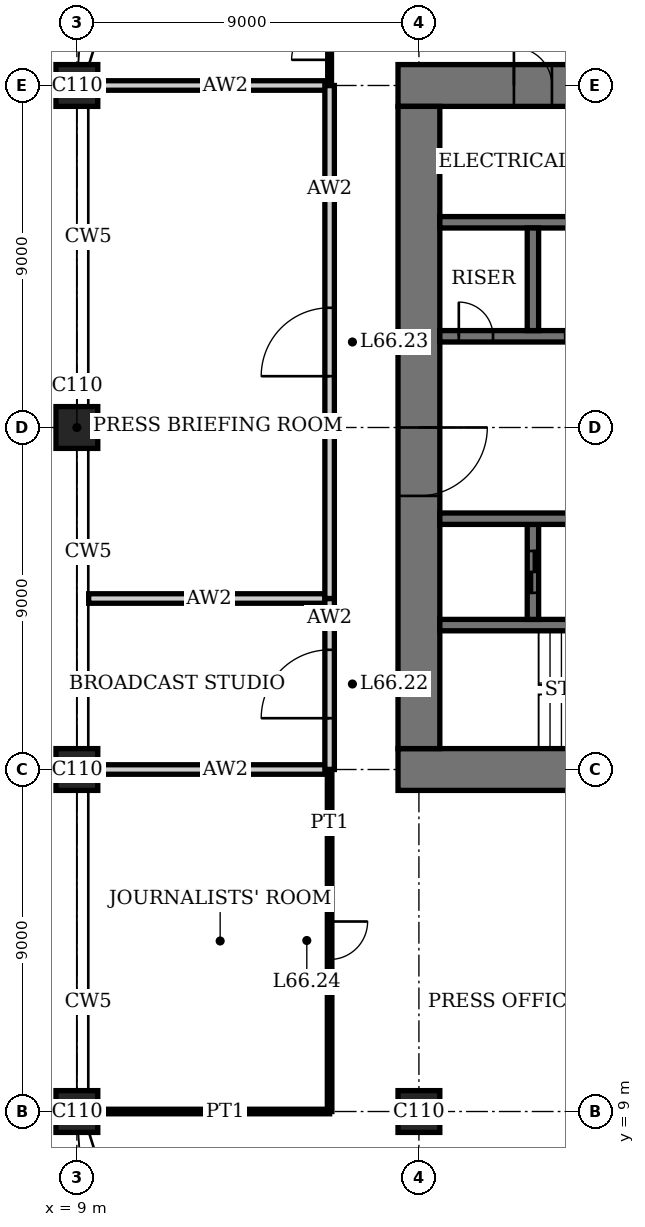
"""IFC4 building model, lengths in metres.
Left out: names, types, materials, properties, quantities, classifications, styles, units other than length and angle.
Written with IfcOpenShell. Run it as: python <this file> out.ifc"""

import sys

from ifc_helpers import new_model, si_unit, direction, frame, frame_2d, origin, origin_2d, place, context, subcontext, project, spatial, rectangle, extrude, element, fill, save


model = new_model("IFC4")
c1 = context("Model", 3, precision=1e-05, world=origin(), true_north=direction((0.0, 1.0)))
c2 = subcontext(c1, "Body", "Model", "MODEL_VIEW")
j1 = project(units=[si_unit("LENGTHUNIT", "METRE"), si_unit("PLANEANGLEUNIT", "RADIAN")], contexts=[c1])
p1 = place(None, origin())
s1 = spatial("IfcSite", under=j1, at=p1, CompositionType="ELEMENT")
p2 = place(p1, origin())
s2 = spatial("IfcBuilding", under=s1, at=p2, CompositionType="ELEMENT")
p3 = place(p2, frame((0.0, 0.0, 271.4)))
s3 = spatial("IfcBuildingStorey", under=s2, at=p3, CompositionType="ELEMENT", Elevation=271.4)
for number, where, z_axis, x_axis in (
    (1, (9.0, 9.0, 0.0), (0.0, 0.0, 1.0), (1.0, 0.0, 0.0)),
    (2, (9.0, 18.0, 0.0), (0.0, 0.0, 1.0), (1.0, 0.0, 0.0)),
    (3, (9.0, 27.0, 0.0), (0.0, 0.0, 1.0), (1.0, 0.0, 0.0)),
    (4, (9.0, 36.0, 0.0), (0.0, 0.0, 1.0), (1.0, 0.0, 0.0)),
    (5, (18.0, 9.0, 0.0), (0.0, 0.0, 1.0), (1.0, 0.0, 0.0)),
):
    element("IfcColumn", number, at=place(p3, frame(where, z_axis=z_axis, x_axis=x_axis)), inside=s3, PredefinedType="COLUMN", context=c2, shape_type="SweptSolid", body=[
        extrude(rectangle(XDim=1.1, YDim=1.1, at=origin_2d()), origin(), (0.0, 0.0, 1.0), 4.0),
    ])
p4 = place(p3, frame((17.45, 18.0, 0.0), z_axis=(0.0, 0.0, 1.0), x_axis=(1.0, 0.0, 0.0)))
e6 = element("IfcWall", 6, at=p4, inside=s3, PredefinedType="SHEAR", context=c2, shape_type="SweptSolid", body=[
    extrude(rectangle(XDim=28.1, YDim=1.1, at=frame_2d((14.05, 0.0))), origin(), (0.0, 0.0, 1.0), 4.0),
])
p5 = place(p4, frame((11.55, 0.0, 0.0)))
e7 = element("IfcOpeningElement", 7, at=p5, cuts=e6, PredefinedType="OPENING", context=c2, shape_type="SweptSolid", body=[
    extrude(rectangle(XDim=1.0, YDim=2.4, at=frame_2d((0.5, 1.2))), frame((0.0, 0.56, 0.0), z_axis=(0.0, -1.0, 0.0), x_axis=(1.0, 0.0, 0.0)), (0.0, 0.0, 1.0), 1.12),
])
p6 = place(p4, frame((16.55, 0.0, 0.0)))
e8 = element("IfcOpeningElement", 8, at=p6, cuts=e6, PredefinedType="OPENING", context=c2, shape_type="SweptSolid", body=[
    extrude(rectangle(XDim=1.0, YDim=2.4, at=frame_2d((0.5, 1.2))), frame((0.0, 0.56, 0.0), z_axis=(0.0, -1.0, 0.0), x_axis=(1.0, 0.0, 0.0)), (0.0, 0.0, 1.0), 1.12),
])
p7 = place(p4, frame((20.0, 0.0, 0.0)))
e9 = element("IfcOpeningElement", 9, at=p7, cuts=e6, PredefinedType="OPENING", context=c2, shape_type="SweptSolid", body=[
    extrude(rectangle(XDim=1.1, YDim=2.4, at=frame_2d((0.55, 1.2))), frame((0.0, 0.56, 0.0), z_axis=(0.0, -1.0, 0.0), x_axis=(1.0, 0.0, 0.0)), (0.0, 0.0, 1.0), 1.12),
])
p8 = place(p4, frame((24.05, 0.0, 0.0)))
e10 = element("IfcOpeningElement", 10, at=p8, cuts=e6, PredefinedType="OPENING", context=c2, shape_type="SweptSolid", body=[
    extrude(rectangle(XDim=1.0, YDim=2.4, at=frame_2d((0.5, 1.2))), frame((0.0, 0.56, 0.0), z_axis=(0.0, -1.0, 0.0), x_axis=(1.0, 0.0, 0.0)), (0.0, 0.0, 1.0), 1.12),
])
p9 = place(p3, frame((45.55, 36.0, 0.0), z_axis=(0.0, 0.0, 1.0), x_axis=(-1.0, 0.0, 0.0)))
e11 = element("IfcWall", 11, at=p9, inside=s3, PredefinedType="SHEAR", context=c2, shape_type="SweptSolid", body=[
    extrude(rectangle(XDim=28.1, YDim=1.1, at=frame_2d((14.05, 0.0))), origin(), (0.0, 0.0, 1.0), 4.0),
])
p10 = place(p9, frame((11.55, 0.0, 0.0)))
e12 = element("IfcOpeningElement", 12, at=p10, cuts=e11, PredefinedType="OPENING", context=c2, shape_type="SweptSolid", body=[
    extrude(rectangle(XDim=1.0, YDim=2.4, at=frame_2d((0.5, 1.2))), frame((0.0, 0.56, 0.0), z_axis=(0.0, -1.0, 0.0), x_axis=(1.0, 0.0, 0.0)), (0.0, 0.0, 1.0), 1.12),
])
p11 = place(p9, frame((16.55, 0.0, 0.0)))
e13 = element("IfcOpeningElement", 13, at=p11, cuts=e11, PredefinedType="OPENING", context=c2, shape_type="SweptSolid", body=[
    extrude(rectangle(XDim=1.0, YDim=2.4, at=frame_2d((0.5, 1.2))), frame((0.0, 0.56, 0.0), z_axis=(0.0, -1.0, 0.0), x_axis=(1.0, 0.0, 0.0)), (0.0, 0.0, 1.0), 1.12),
])
p12 = place(p9, frame((20.0, 0.0, 0.0)))
e14 = element("IfcOpeningElement", 14, at=p12, cuts=e11, PredefinedType="OPENING", context=c2, shape_type="SweptSolid", body=[
    extrude(rectangle(XDim=1.1, YDim=2.4, at=frame_2d((0.55, 1.2))), frame((0.0, 0.56, 0.0), z_axis=(0.0, -1.0, 0.0), x_axis=(1.0, 0.0, 0.0)), (0.0, 0.0, 1.0), 1.12),
])
p13 = place(p9, frame((24.05, 0.0, 0.0)))
e15 = element("IfcOpeningElement", 15, at=p13, cuts=e11, PredefinedType="OPENING", context=c2, shape_type="SweptSolid", body=[
    extrude(rectangle(XDim=1.0, YDim=2.4, at=frame_2d((0.5, 1.2))), frame((0.0, 0.56, 0.0), z_axis=(0.0, -1.0, 0.0), x_axis=(1.0, 0.0, 0.0)), (0.0, 0.0, 1.0), 1.12),
])
p14 = place(p3, frame((18.0, 35.45, 0.0), z_axis=(0.0, 0.0, 1.0), x_axis=(0.0, -1.0, 0.0)))
e16 = element("IfcWall", 16, at=p14, inside=s3, PredefinedType="SHEAR", context=c2, shape_type="SweptSolid", body=[
    extrude(rectangle(XDim=16.9, YDim=1.1, at=frame_2d((8.45, 0.0))), origin(), (0.0, 0.0, 1.0), 4.0),
])
p15 = place(p14, frame((8.45, 0.0, 0.0)))
e17 = element("IfcOpeningElement", 17, at=p15, cuts=e16, PredefinedType="OPENING", context=c2, shape_type="SweptSolid", body=[
    extrude(rectangle(XDim=1.8, YDim=2.4, at=frame_2d((0.9, 1.2))), frame((0.0, 0.56, 0.0), z_axis=(0.0, -1.0, 0.0), x_axis=(1.0, 0.0, 0.0)), (0.0, 0.0, 1.0), 1.12),
])
p16 = place(p3, frame((18.55, 21.8, 0.0), z_axis=(0.0, 0.0, 1.0), x_axis=(1.0, 0.0, 0.0)))
e18 = element("IfcWall", 18, at=p16, inside=s3, PredefinedType="SHEAR", context=c2, shape_type="SweptSolid", body=[
    extrude(rectangle(XDim=8.3, YDim=0.3, at=frame_2d((4.15, 0.0))), origin(), (0.0, 0.0, 1.0), 4.0),
])
p17 = place(p16, frame((6.85, 0.0, 0.0)))
e19 = element("IfcOpeningElement", 19, at=p17, cuts=e18, PredefinedType="OPENING", context=c2, shape_type="SweptSolid", body=[
    extrude(rectangle(XDim=1.0, YDim=2.4, at=frame_2d((0.5, 1.2))), frame((0.0, 0.16, 0.0), z_axis=(0.0, -1.0, 0.0), x_axis=(1.0, 0.0, 0.0)), (0.0, 0.0, 1.0), 0.32),
])
p18 = place(p3, frame((21.0, 21.95, 0.0), z_axis=(0.0, 0.0, 1.0), x_axis=(0.0, 1.0, 0.0)))
e20 = element("IfcWall", 20, at=p18, inside=s3, PredefinedType="SHEAR", context=c2, shape_type="SweptSolid", body=[
    extrude(rectangle(XDim=2.5, YDim=0.3, at=frame_2d((1.25, 0.0))), origin(), (0.0, 0.0, 1.0), 4.0),
])
p19 = place(p18, frame((0.7, 0.0, 0.0)))
e21 = element("IfcOpeningElement", 21, at=p19, cuts=e20, PredefinedType="OPENING", context=c2, shape_type="SweptSolid", body=[
    extrude(rectangle(XDim=1.1, YDim=2.4, at=frame_2d((0.55, 1.2))), frame((0.0, 0.16, 0.0), z_axis=(0.0, -1.0, 0.0), x_axis=(1.0, 0.0, 0.0)), (0.0, 0.0, 1.0), 0.32),
])
p20 = place(p3, frame((18.55, 24.6, 0.0), z_axis=(0.0, 0.0, 1.0), x_axis=(1.0, 0.0, 0.0)))
e22 = element("IfcWall", 22, at=p20, inside=s3, PredefinedType="SHEAR", context=c2, shape_type="SweptSolid", body=[
    extrude(rectangle(XDim=25.9, YDim=0.3, at=frame_2d((12.95, 0.0))), origin(), (0.0, 0.0, 1.0), 4.0),
])
p21 = place(p20, frame((4.95, 0.0, 0.0)))
e23 = element("IfcOpeningElement", 23, at=p21, cuts=e22, PredefinedType="OPENING", context=c2, shape_type="SweptSolid", body=[
    extrude(rectangle(XDim=1.0, YDim=2.4, at=frame_2d((0.5, 1.2))), frame((0.0, 0.16, 0.0), z_axis=(0.0, -1.0, 0.0), x_axis=(1.0, 0.0, 0.0)), (0.0, 0.0, 1.0), 0.32),
])
p22 = place(p20, frame((24.5, 0.0, 0.0)))
e24 = element("IfcOpeningElement", 24, at=p22, cuts=e22, PredefinedType="OPENING", context=c2, shape_type="SweptSolid", body=[
    extrude(rectangle(XDim=0.9, YDim=2.1, at=frame_2d((0.45, 1.05))), frame((0.0, 0.16, 0.0), z_axis=(0.0, -1.0, 0.0), x_axis=(1.0, 0.0, 0.0)), (0.0, 0.0, 1.0), 0.32),
])
p23 = place(p20, frame((9.4, 0.0, 0.0)))
e25 = element("IfcOpeningElement", 25, at=p23, cuts=e22, PredefinedType="OPENING", context=c2, shape_type="SweptSolid", body=[
    extrude(rectangle(XDim=1.1, YDim=2.4, at=frame_2d((0.55, 1.2))), frame((0.0, 0.16, 0.0), z_axis=(0.0, -1.0, 0.0), x_axis=(1.0, 0.0, 0.0)), (0.0, 0.0, 1.0), 0.32),
])
p24 = place(p20, frame((12.4, 0.0, 0.0)))
e26 = element("IfcOpeningElement", 26, at=p24, cuts=e22, PredefinedType="OPENING", context=c2, shape_type="SweptSolid", body=[
    extrude(rectangle(XDim=1.1, YDim=2.4, at=frame_2d((0.55, 1.2))), frame((0.0, 0.16, 0.0), z_axis=(0.0, -1.0, 0.0), x_axis=(1.0, 0.0, 0.0)), (0.0, 0.0, 1.0), 0.32),
])
p25 = place(p20, frame((15.4, 0.0, 0.0)))
e27 = element("IfcOpeningElement", 27, at=p25, cuts=e22, PredefinedType="OPENING", context=c2, shape_type="SweptSolid", body=[
    extrude(rectangle(XDim=1.1, YDim=2.4, at=frame_2d((0.55, 1.2))), frame((0.0, 0.16, 0.0), z_axis=(0.0, -1.0, 0.0), x_axis=(1.0, 0.0, 0.0)), (0.0, 0.0, 1.0), 0.32),
])
p26 = place(p20, frame((18.4, 0.0, 0.0)))
e28 = element("IfcOpeningElement", 28, at=p26, cuts=e22, PredefinedType="OPENING", context=c2, shape_type="SweptSolid", body=[
    extrude(rectangle(XDim=1.1, YDim=2.4, at=frame_2d((0.55, 1.2))), frame((0.0, 0.16, 0.0), z_axis=(0.0, -1.0, 0.0), x_axis=(1.0, 0.0, 0.0)), (0.0, 0.0, 1.0), 0.32),
])
p27 = place(p20, frame((21.3, 0.0, 0.0)))
e29 = element("IfcOpeningElement", 29, at=p27, cuts=e22, PredefinedType="OPENING", context=c2, shape_type="SweptSolid", body=[
    extrude(rectangle(XDim=1.3, YDim=2.4, at=frame_2d((0.65, 1.2))), frame((0.0, 0.16, 0.0), z_axis=(0.0, -1.0, 0.0), x_axis=(1.0, 0.0, 0.0)), (0.0, 0.0, 1.0), 0.32),
])
p28 = place(p3, frame((18.55, 29.4, 0.0), z_axis=(0.0, 0.0, 1.0), x_axis=(1.0, 0.0, 0.0)))
e30 = element("IfcWall", 30, at=p28, inside=s3, PredefinedType="SHEAR", context=c2, shape_type="SweptSolid", body=[
    extrude(rectangle(XDim=25.9, YDim=0.3, at=frame_2d((12.95, 0.0))), origin(), (0.0, 0.0, 1.0), 4.0),
])
p29 = place(p28, frame((19.95, 0.0, 0.0)))
e31 = element("IfcOpeningElement", 31, at=p29, cuts=e30, PredefinedType="OPENING", context=c2, shape_type="SweptSolid", body=[
    extrude(rectangle(XDim=1.0, YDim=2.4, at=frame_2d((0.5, 1.2))), frame((0.0, 0.16, 0.0), z_axis=(0.0, -1.0, 0.0), x_axis=(1.0, 0.0, 0.0)), (0.0, 0.0, 1.0), 0.32),
])
p30 = place(p28, frame((0.5, 0.0, 0.0)))
e32 = element("IfcOpeningElement", 32, at=p30, cuts=e30, PredefinedType="OPENING", context=c2, shape_type="SweptSolid", body=[
    extrude(rectangle(XDim=0.9, YDim=2.1, at=frame_2d((0.45, 1.05))), frame((0.0, 0.16, 0.0), z_axis=(0.0, -1.0, 0.0), x_axis=(1.0, 0.0, 0.0)), (0.0, 0.0, 1.0), 0.32),
])
p31 = place(p28, frame((15.45, 0.0, 0.0)))
e33 = element("IfcOpeningElement", 33, at=p31, cuts=e30, PredefinedType="OPENING", context=c2, shape_type="SweptSolid", body=[
    extrude(rectangle(XDim=1.0, YDim=2.4, at=frame_2d((0.5, 1.2))), frame((0.0, 0.16, 0.0), z_axis=(0.0, -1.0, 0.0), x_axis=(1.0, 0.0, 0.0)), (0.0, 0.0, 1.0), 0.32),
])
p32 = place(p28, frame((12.45, 0.0, 0.0)))
e34 = element("IfcOpeningElement", 34, at=p32, cuts=e30, PredefinedType="OPENING", context=c2, shape_type="SweptSolid", body=[
    extrude(rectangle(XDim=1.0, YDim=2.4, at=frame_2d((0.5, 1.2))), frame((0.0, 0.16, 0.0), z_axis=(0.0, -1.0, 0.0), x_axis=(1.0, 0.0, 0.0)), (0.0, 0.0, 1.0), 0.32),
])
p33 = place(p28, frame((9.45, 0.0, 0.0)))
e35 = element("IfcOpeningElement", 35, at=p33, cuts=e30, PredefinedType="OPENING", context=c2, shape_type="SweptSolid", body=[
    extrude(rectangle(XDim=1.0, YDim=2.4, at=frame_2d((0.5, 1.2))), frame((0.0, 0.16, 0.0), z_axis=(0.0, -1.0, 0.0), x_axis=(1.0, 0.0, 0.0)), (0.0, 0.0, 1.0), 0.32),
])
p34 = place(p28, frame((6.45, 0.0, 0.0)))
e36 = element("IfcOpeningElement", 36, at=p34, cuts=e30, PredefinedType="OPENING", context=c2, shape_type="SweptSolid", body=[
    extrude(rectangle(XDim=1.0, YDim=2.4, at=frame_2d((0.5, 1.2))), frame((0.0, 0.16, 0.0), z_axis=(0.0, -1.0, 0.0), x_axis=(1.0, 0.0, 0.0)), (0.0, 0.0, 1.0), 0.32),
])
p35 = place(p28, frame((3.3, 0.0, 0.0)))
e37 = element("IfcOpeningElement", 37, at=p35, cuts=e30, PredefinedType="OPENING", context=c2, shape_type="SweptSolid", body=[
    extrude(rectangle(XDim=1.3, YDim=2.4, at=frame_2d((0.65, 1.2))), frame((0.0, 0.16, 0.0), z_axis=(0.0, -1.0, 0.0), x_axis=(1.0, 0.0, 0.0)), (0.0, 0.0, 1.0), 0.32),
])
p36 = place(p3, frame((18.55, 32.4, 0.0), z_axis=(0.0, 0.0, 1.0), x_axis=(1.0, 0.0, 0.0)))
e38 = element("IfcWall", 38, at=p36, inside=s3, PredefinedType="SHEAR", context=c2, shape_type="SweptSolid", body=[
    extrude(rectangle(XDim=17.3, YDim=0.3, at=frame_2d((8.65, 0.0))), origin(), (0.0, 0.0, 1.0), 4.0),
])
p37 = place(p3, frame((21.0, 29.55, 0.0), z_axis=(0.0, 0.0, 1.0), x_axis=(0.0, 1.0, 0.0)))
e39 = element("IfcWall", 39, at=p37, inside=s3, PredefinedType="SHEAR", context=c2, shape_type="SweptSolid", body=[
    extrude(rectangle(XDim=2.7, YDim=0.3, at=frame_2d((1.35, 0.0))), origin(), (0.0, 0.0, 1.0), 4.0),
])
p38 = place(p3, frame((9.55, 9.0, 0.0), z_axis=(0.0, 0.0, 1.0), x_axis=(1.0, 0.0, 0.0)))
e40 = element("IfcWall", 40, at=p38, inside=s3, PredefinedType="PARTITIONING", context=c2, shape_type="SweptSolid", body=[
    extrude(rectangle(XDim=6.1, YDim=0.12, at=frame_2d((3.05, 0.0))), origin(), (0.0, 0.0, 1.0), 3.05),
])
p39 = place(p3, frame((9.55, 18.0, 0.0), z_axis=(0.0, 0.0, 1.0), x_axis=(1.0, 0.0, 0.0)))
e41 = element("IfcWall", 41, at=p39, inside=s3, PredefinedType="PARTITIONING", context=c2, shape_type="SweptSolid", body=[
    extrude(rectangle(XDim=6.1, YDim=0.25, at=frame_2d((3.05, 0.0))), origin(), (0.0, 0.0, 1.0), 3.05),
])
p40 = place(p3, frame((9.31, 22.5, 0.0), z_axis=(0.0, 0.0, 1.0), x_axis=(1.0, 0.0, 0.0)))
e42 = element("IfcWall", 42, at=p40, inside=s3, PredefinedType="PARTITIONING", context=c2, shape_type="SweptSolid", body=[
    extrude(rectangle(XDim=6.34, YDim=0.25, at=frame_2d((3.17, 0.0))), origin(), (0.0, 0.0, 1.0), 3.1),
])
p41 = place(p3, frame((9.55, 36.0, 0.0), z_axis=(0.0, 0.0, 1.0), x_axis=(1.0, 0.0, 0.0)))
e43 = element("IfcWall", 43, at=p41, inside=s3, PredefinedType="PARTITIONING", context=c2, shape_type="SweptSolid", body=[
    extrude(rectangle(XDim=6.1, YDim=0.25, at=frame_2d((3.05, 0.0))), origin(), (0.0, 0.0, 1.0), 3.05),
])
p42 = place(p3, frame((15.65, 18.0, 0.0), z_axis=(0.0, 0.0, 1.0), x_axis=(0.0, 1.0, 0.0)))
e44 = element("IfcWall", 44, at=p42, inside=s3, PredefinedType="PARTITIONING", context=c2, shape_type="SweptSolid", body=[
    extrude(rectangle(XDim=4.5, YDim=0.25, at=frame_2d((2.25, 0.0))), origin(), (0.0, 0.0, 1.0), 3.75),
])
p43 = place(p42, frame((1.35, 0.0, 0.0)))
e45 = element("IfcOpeningElement", 45, at=p43, cuts=e44, PredefinedType="OPENING", context=c2, shape_type="SweptSolid", body=[
    extrude(rectangle(XDim=1.8, YDim=2.4, at=frame_2d((0.9, 1.2))), frame((0.0, 0.135, 0.0), z_axis=(0.0, -1.0, 0.0), x_axis=(1.0, 0.0, 0.0)), (0.0, 0.0, 1.0), 0.27),
])
p44 = place(p3, frame((15.65, 22.5, 0.0), z_axis=(0.0, 0.0, 1.0), x_axis=(0.0, 1.0, 0.0)))
e46 = element("IfcWall", 46, at=p44, inside=s3, PredefinedType="PARTITIONING", context=c2, shape_type="SweptSolid", body=[
    extrude(rectangle(XDim=13.5, YDim=0.25, at=frame_2d((6.75, 0.0))), origin(), (0.0, 0.0, 1.0), 3.75),
])
p45 = place(p44, frame((5.85, 0.0, 0.0)))
e47 = element("IfcOpeningElement", 47, at=p45, cuts=e46, PredefinedType="OPENING", context=c2, shape_type="SweptSolid", body=[
    extrude(rectangle(XDim=1.8, YDim=2.4, at=frame_2d((0.9, 1.2))), frame((0.0, 0.135, 0.0), z_axis=(0.0, -1.0, 0.0), x_axis=(1.0, 0.0, 0.0)), (0.0, 0.0, 1.0), 0.27),
])
p46 = place(p3, frame((15.65, 9.0, 0.0), z_axis=(0.0, 0.0, 1.0), x_axis=(0.0, 1.0, 0.0)))
e48 = element("IfcWall", 48, at=p46, inside=s3, PredefinedType="PARTITIONING", context=c2, shape_type="SweptSolid", body=[
    extrude(rectangle(XDim=9.0, YDim=0.12, at=frame_2d((4.5, 0.0))), origin(), (0.0, 0.0, 1.0), 3.75),
])
p47 = place(p46, frame((4.0, 0.0, 0.0)))
e49 = element("IfcOpeningElement", 49, at=p47, cuts=e48, PredefinedType="OPENING", context=c2, shape_type="SweptSolid", body=[
    extrude(rectangle(XDim=1.0, YDim=2.4, at=frame_2d((0.5, 1.2))), frame((0.0, 0.07, 0.0), z_axis=(0.0, -1.0, 0.0), x_axis=(1.0, 0.0, 0.0)), (0.0, 0.0, 1.0), 0.14),
])
p48 = place(p3, frame((15.65, 36.0, 0.0), z_axis=(0.0, 0.0, 1.0), x_axis=(0.0, 1.0, 0.0)))
e50 = element("IfcWall", 50, at=p48, inside=s3, PredefinedType="PARTITIONING", context=c2, shape_type="SweptSolid", body=[
    extrude(rectangle(XDim=2.35, YDim=0.1, at=frame_2d((1.175, 0.0))), origin(), (0.0, 0.0, 1.0), 3.75),
])
p49 = place(p48, frame((0.675, 0.0, 0.0)))
e51 = element("IfcOpeningElement", 51, at=p49, cuts=e50, PredefinedType="OPENING", context=c2, shape_type="SweptSolid", body=[
    extrude(rectangle(XDim=1.0, YDim=2.4, at=frame_2d((0.5, 1.2))), frame((0.0, 0.06, 0.0), z_axis=(0.0, -1.0, 0.0), x_axis=(1.0, 0.0, 0.0)), (0.0, 0.0, 1.0), 0.12),
])
p50 = place(p15, origin())
e52 = element("IfcDoor", 52, at=p50, inside=s3, OperationType="DOUBLE_DOOR_DOUBLE_SWING", PredefinedType="DOOR", context=c2, shape_type="SweptSolid", body=[
    extrude(rectangle(XDim=1.8, YDim=2.4, at=frame_2d((0.9, 1.2))), frame((0.0, 0.03, 0.0), z_axis=(0.0, -1.0, 0.0), x_axis=(1.0, 0.0, 0.0)), (0.0, 0.0, 1.0), 0.06),
    extrude(rectangle(XDim=0.04, YDim=2.4, at=frame_2d((0.02, 1.2))), frame((0.0, 0.55, 0.0), z_axis=(0.0, -1.0, 0.0), x_axis=(1.0, 0.0, 0.0)), (0.0, 0.0, 1.0), 1.1),
    extrude(rectangle(XDim=0.04, YDim=2.4, at=frame_2d((1.78, 1.2))), frame((0.0, 0.55, 0.0), z_axis=(0.0, -1.0, 0.0), x_axis=(1.0, 0.0, 0.0)), (0.0, 0.0, 1.0), 1.1),
    extrude(rectangle(XDim=1.8, YDim=0.04, at=frame_2d((0.9, 2.38))), frame((0.0, 0.55, 0.0), z_axis=(0.0, -1.0, 0.0), x_axis=(1.0, 0.0, 0.0)), (0.0, 0.0, 1.0), 1.1),
])
fill(e17, e52)
p51 = place(p13, origin())
e53 = element("IfcDoor", 53, at=p51, inside=s3, OperationType="SINGLE_SWING_RIGHT", PredefinedType="DOOR", context=c2, shape_type="SweptSolid", body=[
    extrude(rectangle(XDim=1.0, YDim=2.4, at=frame_2d((0.5, 1.2))), frame((0.0, 0.025, 0.0), z_axis=(0.0, -1.0, 0.0), x_axis=(1.0, 0.0, 0.0)), (0.0, 0.0, 1.0), 0.05),
    extrude(rectangle(XDim=0.04, YDim=2.4, at=frame_2d((0.02, 1.2))), frame((0.0, 0.4, 0.0), z_axis=(0.0, -1.0, 0.0), x_axis=(1.0, 0.0, 0.0)), (0.0, 0.0, 1.0), 0.8),
    extrude(rectangle(XDim=0.04, YDim=2.4, at=frame_2d((0.98, 1.2))), frame((0.0, 0.4, 0.0), z_axis=(0.0, -1.0, 0.0), x_axis=(1.0, 0.0, 0.0)), (0.0, 0.0, 1.0), 0.8),
    extrude(rectangle(XDim=1.0, YDim=0.04, at=frame_2d((0.5, 2.38))), frame((0.0, 0.4, 0.0), z_axis=(0.0, -1.0, 0.0), x_axis=(1.0, 0.0, 0.0)), (0.0, 0.0, 1.0), 0.8),
])
fill(e15, e53)
p52 = place(p30, origin())
e54 = element("IfcDoor", 54, at=p52, inside=s3, OperationType="SINGLE_SWING_RIGHT", PredefinedType="DOOR", context=c2, shape_type="SweptSolid", body=[
    extrude(rectangle(XDim=0.9, YDim=2.1, at=frame_2d((0.45, 1.05))), frame((0.0, 0.03, 0.0), z_axis=(0.0, -1.0, 0.0), x_axis=(1.0, 0.0, 0.0)), (0.0, 0.0, 1.0), 0.06),
])
fill(e32, e54)
p53 = place(p43, origin())
e55 = element("IfcDoor", 55, at=p53, inside=s3, OperationType="DOUBLE_DOOR_SINGLE_SWING", PredefinedType="DOOR", context=c2, shape_type="SweptSolid", body=[
    extrude(rectangle(XDim=1.8, YDim=2.4, at=frame_2d((0.9, 1.2))), frame((0.0, 0.025, 0.0), z_axis=(0.0, -1.0, 0.0), x_axis=(1.0, 0.0, 0.0)), (0.0, 0.0, 1.0), 0.05),
])
fill(e45, e55)
p54 = place(p45, origin())
e56 = element("IfcDoor", 56, at=p54, inside=s3, OperationType="DOUBLE_DOOR_SINGLE_SWING", PredefinedType="DOOR", context=c2, shape_type="SweptSolid", body=[
    extrude(rectangle(XDim=1.8, YDim=2.4, at=frame_2d((0.9, 1.2))), frame((0.0, 0.025, 0.0), z_axis=(0.0, -1.0, 0.0), x_axis=(1.0, 0.0, 0.0)), (0.0, 0.0, 1.0), 0.05),
])
fill(e47, e56)
p55 = place(p47, origin())
e57 = element("IfcDoor", 57, at=p55, inside=s3, OperationType="SINGLE_SWING_RIGHT", PredefinedType="DOOR", context=c2, shape_type="SweptSolid", body=[
    extrude(rectangle(XDim=1.0, YDim=2.4, at=frame_2d((0.5, 1.2))), frame((0.0, 0.025, 0.0), z_axis=(0.0, -1.0, 0.0), x_axis=(1.0, 0.0, 0.0)), (0.0, 0.0, 1.0), 0.05),
])
fill(e49, e57)
p56 = place(p49, origin())
e58 = element("IfcDoor", 58, at=p56, inside=s3, OperationType="SINGLE_SWING_RIGHT", PredefinedType="DOOR", context=c2, shape_type="SweptSolid", body=[
    extrude(rectangle(XDim=1.0, YDim=2.4, at=frame_2d((0.5, 1.2))), frame((0.0, 0.02, 0.0), z_axis=(0.0, -1.0, 0.0), x_axis=(1.0, 0.0, 0.0)), (0.0, 0.0, 1.0), 0.04),
])
fill(e51, e58)
p57 = place(p35, origin())
e59 = element("IfcDoor", 59, at=p57, inside=s3, OperationType="DOUBLE_DOOR_SLIDING", PredefinedType="DOOR", context=c2, shape_type="SweptSolid", body=[
    extrude(rectangle(XDim=1.3, YDim=2.4, at=frame_2d((0.65, 1.2))), frame((0.0, 0.02, 0.0), z_axis=(0.0, -1.0, 0.0), x_axis=(1.0, 0.0, 0.0)), (0.0, 0.0, 1.0), 0.04),
])
fill(e37, e59)
p58 = place(p19, origin())
e60 = element("IfcDoor", 60, at=p58, inside=s3, OperationType="DOUBLE_DOOR_SLIDING", PredefinedType="DOOR", context=c2, shape_type="SweptSolid", body=[
    extrude(rectangle(XDim=1.1, YDim=2.4, at=frame_2d((0.55, 1.2))), frame((0.0, 0.03, 0.0), z_axis=(0.0, -1.0, 0.0), x_axis=(1.0, 0.0, 0.0)), (0.0, 0.0, 1.0), 0.06),
])
fill(e21, e60)
save(model, sys.argv[1])
